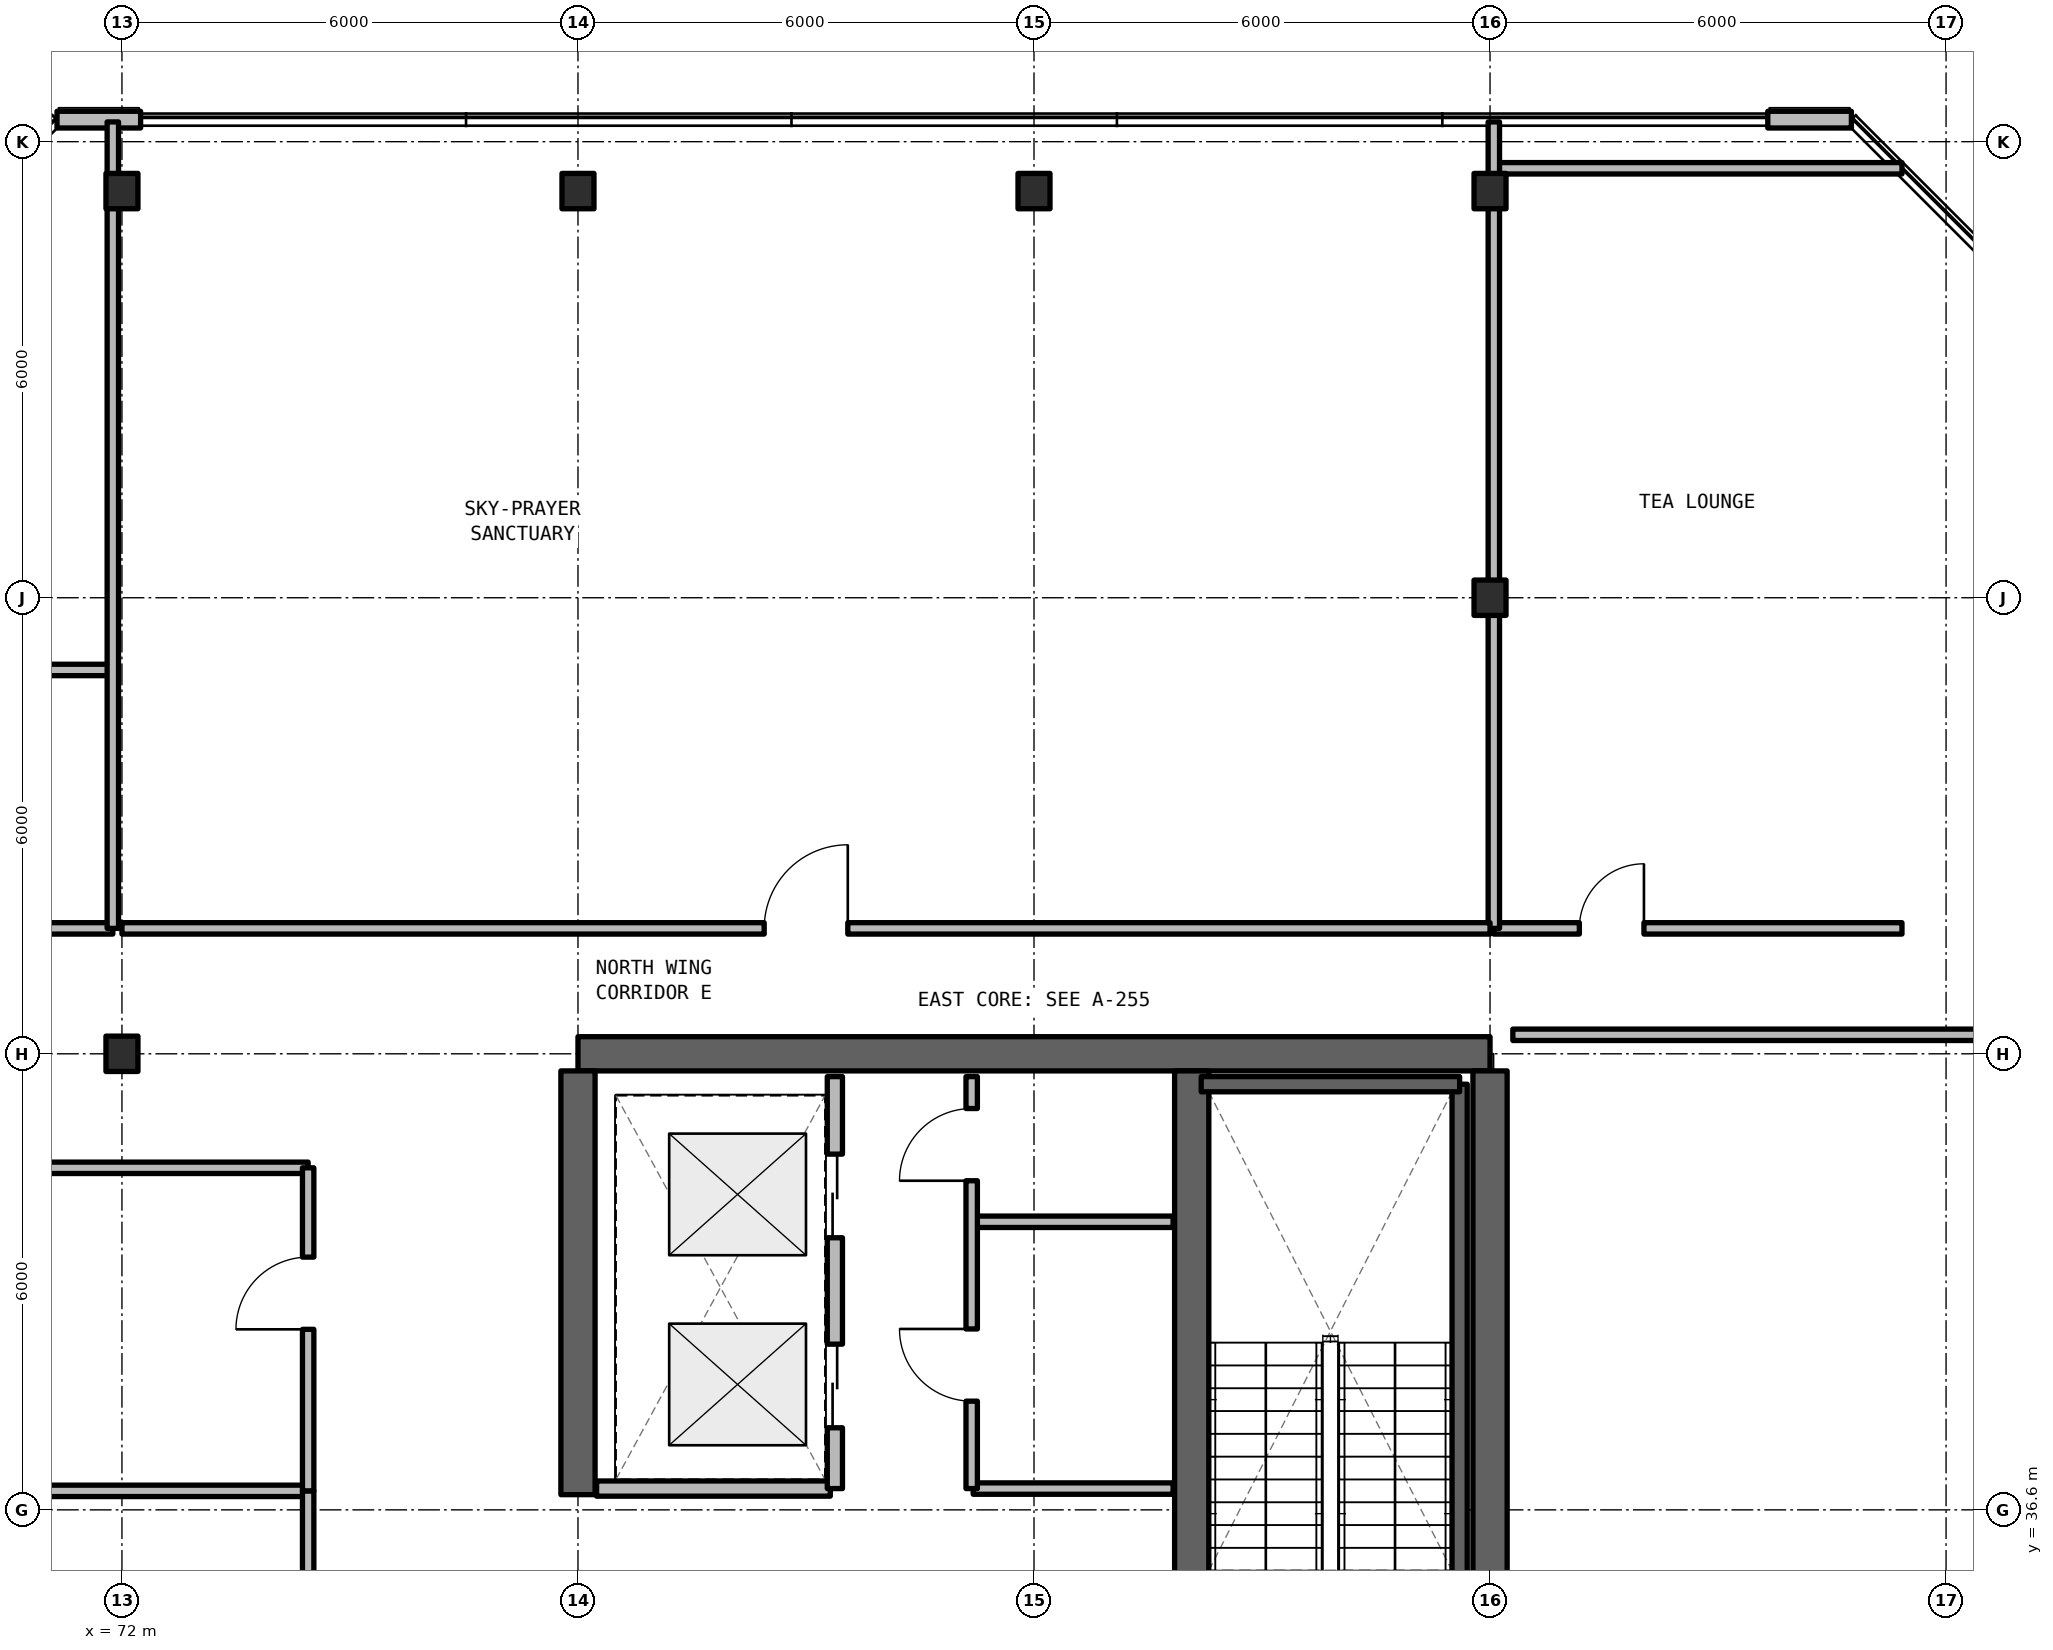
"""IFC4 building model, lengths in metres.
Left out: names, types, materials, properties, quantities, classifications, styles, units other than length and angle.
Written with IfcOpenShell. Run it as: python <this file> out.ifc"""

import sys

from ifc_helpers import new_model, si_unit, direction, frame, frame_2d, origin, origin_2d, place, context, subcontext, project, spatial, rectangle, i_section, extrude, element, fill, save


model = new_model("IFC4")
c1 = context("Model", 3, precision=1e-05, world=origin(), true_north=direction((0.0, 1.0)))
c2 = subcontext(c1, "Body", "Model", "MODEL_VIEW")
j1 = project(units=[si_unit("LENGTHUNIT", "METRE"), si_unit("PLANEANGLEUNIT", "RADIAN")], contexts=[c1])
p1 = place(None, origin())
s1 = spatial("IfcSite", under=j1, at=p1, CompositionType="ELEMENT")
p2 = place(p1, origin())
s2 = spatial("IfcBuilding", under=s1, at=p2, CompositionType="ELEMENT")
p3 = place(p2, frame((0.0, 0.0, 267.96)))
s3 = spatial("IfcBuildingStorey", under=s2, at=p3, CompositionType="ELEMENT", Elevation=267.96)
p4 = place(p3, frame((90.0, 42.6, 0.0), z_axis=(0.0, 0.0, 1.0), x_axis=(-1.0, 0.0, 0.0)))
e1 = element("IfcWall", 1, at=p4, inside=s3, PredefinedType="SHEAR", context=c2, shape_type="SweptSolid", body=[
    extrude(rectangle(XDim=12.0, YDim=0.45, at=frame_2d((6.0, 0.0))), origin(), (0.0, 0.0, 1.0), 3.63),
])
p5 = place(p3, frame((90.0, 24.825, 0.0), z_axis=(0.0, 0.0, 1.0), x_axis=(0.0, 1.0, 0.0)))
e2 = element("IfcWall", 2, at=p5, inside=s3, PredefinedType="SHEAR", context=c2, shape_type="SweptSolid", body=[
    extrude(rectangle(XDim=17.55, YDim=0.45, at=frame_2d((8.775, 0.0))), origin(), (0.0, 0.0, 1.0), 3.63),
])
p6 = place(p3, frame((78.0, 36.8, 0.0), z_axis=(0.0, 0.0, 1.0), x_axis=(0.0, 1.0, 0.0)))
e3 = element("IfcWall", 3, at=p6, inside=s3, PredefinedType="SHEAR", context=c2, shape_type="SweptSolid", body=[
    extrude(rectangle(XDim=5.575, YDim=0.45, at=frame_2d((2.788, 0.0))), origin(), (0.0, 0.0, 1.0), 3.63),
])
p7 = place(p3, frame((86.075, 24.825, 0.0), z_axis=(0.0, 0.0, 1.0), x_axis=(0.0, 1.0, 0.0)))
e4 = element("IfcWall", 4, at=p7, inside=s3, PredefinedType="SHEAR", context=c2, shape_type="SweptSolid", body=[
    extrude(rectangle(XDim=17.55, YDim=0.45, at=frame_2d((8.775, 0.0))), origin(), (0.0, 0.0, 1.0), 3.63),
])
p8 = place(p7, frame((0.425, 0.0, 0.0)))
e5 = element("IfcOpeningElement", 5, at=p8, cuts=e4, PredefinedType="OPENING", context=c2, shape_type="SweptSolid", body=[
    extrude(rectangle(XDim=1.15, YDim=2.15, at=frame_2d((0.575, 1.075))), frame((0.0, 0.235, 0.0), z_axis=(0.0, -1.0, 0.0), x_axis=(1.0, 0.0, 0.0)), (0.0, 0.0, 1.0), 0.47),
])
p9 = place(p7, frame((9.625, 0.0, 0.0)))
e6 = element("IfcOpeningElement", 6, at=p9, cuts=e4, PredefinedType="OPENING", context=c2, shape_type="SweptSolid", body=[
    extrude(rectangle(XDim=1.15, YDim=2.15, at=frame_2d((0.575, 1.075))), frame((0.0, 0.235, 0.0), z_axis=(0.0, -1.0, 0.0), x_axis=(1.0, 0.0, 0.0)), (0.0, 0.0, 1.0), 0.47),
])
for number, where, z_axis, x_axis in (
    (7, (72.0, 42.6, 0.0), (0.0, 0.0, 1.0), (1.0, 0.0, 0.0)),
    (8, (90.0, 48.6, 0.0), (0.0, 0.0, 1.0), (1.0, 0.0, 0.0)),
    (9, (72.0, 53.95, 0.0), (0.0, 0.0, 1.0), (1.0, 0.0, 0.0)),
    (10, (78.0, 53.95, 0.0), (0.0, 0.0, 1.0), (1.0, 0.0, 0.0)),
    (11, (84.0, 53.95, 0.0), (0.0, 0.0, 1.0), (1.0, 0.0, 0.0)),
    (12, (90.0, 53.95, 0.0), (0.0, 0.0, 1.0), (1.0, 0.0, 0.0)),
):
    element("IfcColumn", number, at=place(p3, frame(where, z_axis=z_axis, x_axis=x_axis)), inside=s3, PredefinedType="COLUMN", context=c2, shape_type="SweptSolid", body=[
        extrude(i_section(OverallWidth=0.421, OverallDepth=0.465, WebThickness=0.045, FlangeThickness=0.07, FilletRadius=0.015, at=origin_2d()), origin(), (0.0, 0.0, 1.0), 3.63),
    ])
for number, where, z_axis, x_axis in (
    (13, (94.754, 54.89, 0.0), (0.0, 0.0, 1.0), (-1.0, 0.0, 0.0)),
    (14, (72.246, 54.89, 0.0), (0.0, 0.0, 1.0), (-1.0, 0.0, 0.0)),
):
    element("IfcWall", number, at=place(p3, frame(where, z_axis=z_axis, x_axis=x_axis)), inside=s3, PredefinedType="SOLIDWALL", context=c2, shape_type="SweptSolid", body=[
        extrude(rectangle(XDim=1.1, YDim=0.22, at=frame_2d((0.55, 0.0))), origin(), (0.0, 0.0, 1.0), 3.41),
    ])
for number, where, z_axis, x_axis in (
    (15, (83.2, 36.88, 0.0), (0.0, 0.0, 1.0), (1.0, 0.0, 0.0)),
    (16, (83.2, 40.39, 0.0), (0.0, 0.0, 1.0), (1.0, 0.0, 0.0)),
):
    element("IfcWall", number, at=place(p3, frame(where, z_axis=z_axis, x_axis=x_axis)), inside=s3, PredefinedType="SOLIDWALL", context=c2, shape_type="SweptSolid", body=[
        extrude(rectangle(XDim=2.63, YDim=0.15, at=frame_2d((1.315, 0.0))), origin(), (0.0, 0.0, 1.0), 2.63),
    ])
p10 = place(p3, frame((83.18, 36.88, 0.0), z_axis=(0.0, 0.0, 1.0), x_axis=(0.0, 1.0, 0.0)))
e17 = element("IfcWall", 17, at=p10, inside=s3, PredefinedType="SOLIDWALL", context=c2, shape_type="SweptSolid", body=[
    extrude(rectangle(XDim=5.42, YDim=0.15, at=frame_2d((2.71, 0.0))), origin(), (0.0, 0.0, 1.0), 2.63),
])
p11 = place(p10, frame((1.15, 0.0, 0.0)))
e18 = element("IfcOpeningElement", 18, at=p11, cuts=e17, PredefinedType="OPENING", context=c2, shape_type="SweptSolid", body=[
    extrude(rectangle(XDim=0.95, YDim=2.15, at=frame_2d((0.475, 1.075))), frame((0.0, 0.085, 0.0), z_axis=(0.0, -1.0, 0.0), x_axis=(1.0, 0.0, 0.0)), (0.0, 0.0, 1.0), 0.17),
])
p12 = place(p10, frame((4.05, 0.0, 0.0)))
e19 = element("IfcOpeningElement", 19, at=p12, cuts=e17, PredefinedType="OPENING", context=c2, shape_type="SweptSolid", body=[
    extrude(rectangle(XDim=0.95, YDim=2.15, at=frame_2d((0.475, 1.075))), frame((0.0, 0.085, 0.0), z_axis=(0.0, -1.0, 0.0), x_axis=(1.0, 0.0, 0.0)), (0.0, 0.0, 1.0), 0.17),
])
p13 = place(p3, frame((78.245, 36.88, 0.0), z_axis=(0.0, 0.0, 1.0), x_axis=(1.0, 0.0, 0.0)))
e20 = element("IfcWall", 20, at=p13, inside=s3, PredefinedType="SOLIDWALL", context=c2, shape_type="SweptSolid", body=[
    extrude(rectangle(XDim=3.075, YDim=0.2, at=frame_2d((1.538, 0.0))), origin(), (0.0, 0.0, 1.0), 2.63),
])
p14 = place(p3, frame((81.38, 36.88, 0.0), z_axis=(0.0, 0.0, 1.0), x_axis=(0.0, 1.0, 0.0)))
e21 = element("IfcWall", 21, at=p14, inside=s3, PredefinedType="SOLIDWALL", context=c2, shape_type="SweptSolid", body=[
    extrude(rectangle(XDim=5.42, YDim=0.2, at=frame_2d((2.71, 0.0))), origin(), (0.0, 0.0, 1.0), 2.63),
])
p15 = place(p14, frame((0.8, 0.0, 0.0)))
e22 = element("IfcOpeningElement", 22, at=p15, cuts=e21, PredefinedType="OPENING", context=c2, shape_type="SweptSolid", body=[
    extrude(rectangle(XDim=1.1, YDim=2.2, at=frame_2d((0.55, 1.1))), frame((0.0, 0.11, 0.0), z_axis=(0.0, -1.0, 0.0), x_axis=(1.0, 0.0, 0.0)), (0.0, 0.0, 1.0), 0.22),
])
p16 = place(p14, frame((3.3, 0.0, 0.0)))
e23 = element("IfcOpeningElement", 23, at=p16, cuts=e21, PredefinedType="OPENING", context=c2, shape_type="SweptSolid", body=[
    extrude(rectangle(XDim=1.1, YDim=2.2, at=frame_2d((0.55, 1.1))), frame((0.0, 0.11, 0.0), z_axis=(0.0, -1.0, 0.0), x_axis=(1.0, 0.0, 0.0)), (0.0, 0.0, 1.0), 0.22),
])
p17 = place(p3, frame((64.8, 44.25, 0.0), z_axis=(0.0, 0.0, 1.0), x_axis=(1.0, 0.0, 0.0)))
e24 = element("IfcWall", 24, at=p17, inside=s3, PredefinedType="SOLIDWALL", context=c2, shape_type="SweptSolid", body=[
    extrude(rectangle(XDim=7.08, YDim=0.15, at=frame_2d((3.54, 0.0))), origin(), (0.0, 0.0, 1.0), 2.63),
])
p18 = place(p17, frame((3.225, 0.0, 0.0)))
e25 = element("IfcOpeningElement", 25, at=p18, cuts=e24, PredefinedType="OPENING", context=c2, shape_type="SweptSolid", body=[
    extrude(rectangle(XDim=0.85, YDim=2.1, at=frame_2d((0.425, 1.05))), frame((0.0, 0.085, 0.0), z_axis=(0.0, -1.0, 0.0), x_axis=(1.0, 0.0, 0.0)), (0.0, 0.0, 1.0), 0.17),
])
p19 = place(p3, frame((64.8, 47.65, 0.0), z_axis=(0.0, 0.0, 1.0), x_axis=(1.0, 0.0, 0.0)))
e26 = element("IfcWall", 26, at=p19, inside=s3, PredefinedType="SOLIDWALL", context=c2, shape_type="SweptSolid", body=[
    extrude(rectangle(XDim=7.08, YDim=0.15, at=frame_2d((3.54, 0.0))), origin(), (0.0, 0.0, 1.0), 2.63),
])
p20 = place(p3, frame((71.88, 44.25, 0.0), z_axis=(0.0, 0.0, 1.0), x_axis=(0.0, 1.0, 0.0)))
e27 = element("IfcWall", 27, at=p20, inside=s3, PredefinedType="SOLIDWALL", context=c2, shape_type="SweptSolid", body=[
    extrude(rectangle(XDim=10.61, YDim=0.15, at=frame_2d((5.305, 0.0))), origin(), (0.0, 0.0, 1.0), 2.63),
])
p21 = place(p3, frame((90.3, 42.85, 0.0), z_axis=(0.0, 0.0, 1.0), x_axis=(1.0, 0.0, 0.0)))
e28 = element("IfcWall", 28, at=p21, inside=s3, PredefinedType="SOLIDWALL", context=c2, shape_type="SweptSolid", body=[
    extrude(rectangle(XDim=8.52, YDim=0.15, at=frame_2d((4.26, 0.0))), origin(), (0.0, 0.0, 1.0), 2.63),
])
p22 = place(p3, frame((90.05, 44.25, 0.0), z_axis=(0.0, 0.0, 1.0), x_axis=(1.0, 0.0, 0.0)))
e29 = element("IfcWall", 29, at=p22, inside=s3, PredefinedType="SOLIDWALL", context=c2, shape_type="SweptSolid", body=[
    extrude(rectangle(XDim=5.37, YDim=0.15, at=frame_2d((2.685, 0.0))), origin(), (0.0, 0.0, 1.0), 2.63),
])
p23 = place(p22, frame((1.125, 0.0, 0.0)))
e30 = element("IfcOpeningElement", 30, at=p23, cuts=e29, PredefinedType="OPENING", context=c2, shape_type="SweptSolid", body=[
    extrude(rectangle(XDim=0.85, YDim=2.1, at=frame_2d((0.425, 1.05))), frame((0.0, 0.085, 0.0), z_axis=(0.0, -1.0, 0.0), x_axis=(1.0, 0.0, 0.0)), (0.0, 0.0, 1.0), 0.17),
])
p24 = place(p3, frame((90.05, 54.25, 0.0), z_axis=(0.0, 0.0, 1.0), x_axis=(1.0, 0.0, 0.0)))
e31 = element("IfcWall", 31, at=p24, inside=s3, PredefinedType="SOLIDWALL", context=c2, shape_type="SweptSolid", body=[
    extrude(rectangle(XDim=5.37, YDim=0.15, at=frame_2d((2.685, 0.0))), origin(), (0.0, 0.0, 1.0), 2.63),
])
p25 = place(p3, frame((90.05, 44.25, 0.0), z_axis=(0.0, 0.0, 1.0), x_axis=(0.0, 1.0, 0.0)))
e32 = element("IfcWall", 32, at=p25, inside=s3, PredefinedType="SOLIDWALL", context=c2, shape_type="SweptSolid", body=[
    extrude(rectangle(XDim=10.61, YDim=0.15, at=frame_2d((5.305, 0.0))), origin(), (0.0, 0.0, 1.0), 2.63),
])
p26 = place(p3, frame((72.0, 44.25, 0.0), z_axis=(0.0, 0.0, 1.0), x_axis=(1.0, 0.0, 0.0)))
e33 = element("IfcWall", 33, at=p26, inside=s3, PredefinedType="SOLIDWALL", context=c2, shape_type="SweptSolid", body=[
    extrude(rectangle(XDim=18.0, YDim=0.15, at=frame_2d((9.0, 0.0))), origin(), (0.0, 0.0, 1.0), 2.63),
])
p27 = place(p26, frame((8.45, 0.0, 0.0)))
e34 = element("IfcOpeningElement", 34, at=p27, cuts=e33, PredefinedType="OPENING", context=c2, shape_type="SweptSolid", body=[
    extrude(rectangle(XDim=1.1, YDim=2.15, at=frame_2d((0.55, 1.075))), frame((0.0, 0.085, 0.0), z_axis=(0.0, -1.0, 0.0), x_axis=(1.0, 0.0, 0.0)), (0.0, 0.0, 1.0), 0.17),
])
p28 = place(p3, frame((60.2, 36.85, 0.0), z_axis=(0.0, 0.0, 1.0), x_axis=(1.0, 0.0, 0.0)))
e35 = element("IfcWall", 35, at=p28, inside=s3, PredefinedType="SOLIDWALL", context=c2, shape_type="SweptSolid", body=[
    extrude(rectangle(XDim=14.25, YDim=0.15, at=frame_2d((7.125, 0.0))), origin(), (0.0, 0.0, 1.0), 2.63),
])
p29 = place(p3, frame((74.45, 31.25, 0.0), z_axis=(0.0, 0.0, 1.0), x_axis=(0.0, 1.0, 0.0)))
e36 = element("IfcWall", 36, at=p29, inside=s3, PredefinedType="SOLIDWALL", context=c2, shape_type="SweptSolid", body=[
    extrude(rectangle(XDim=5.6, YDim=0.15, at=frame_2d((2.8, 0.0))), origin(), (0.0, 0.0, 1.0), 2.63),
])
p30 = place(p29, frame((2.525, 0.0, 0.0)))
e37 = element("IfcOpeningElement", 37, at=p30, cuts=e36, PredefinedType="OPENING", context=c2, shape_type="SweptSolid", body=[
    extrude(rectangle(XDim=0.95, YDim=2.15, at=frame_2d((0.475, 1.075))), frame((0.0, 0.085, 0.0), z_axis=(0.0, -1.0, 0.0), x_axis=(1.0, 0.0, 0.0)), (0.0, 0.0, 1.0), 0.17),
])
p31 = place(p3, frame((60.2, 41.1, 0.0), z_axis=(0.0, 0.0, 1.0), x_axis=(1.0, 0.0, 0.0)))
e38 = element("IfcWall", 38, at=p31, inside=s3, PredefinedType="SOLIDWALL", context=c2, shape_type="SweptSolid", body=[
    extrude(rectangle(XDim=14.25, YDim=0.15, at=frame_2d((7.125, 0.0))), origin(), (0.0, 0.0, 1.0), 2.63),
])
p32 = place(p3, frame((74.45, 36.85, 0.0), z_axis=(0.0, 0.0, 1.0), x_axis=(0.0, 1.0, 0.0)))
e39 = element("IfcWall", 39, at=p32, inside=s3, PredefinedType="SOLIDWALL", context=c2, shape_type="SweptSolid", body=[
    extrude(rectangle(XDim=4.25, YDim=0.15, at=frame_2d((2.125, 0.0))), origin(), (0.0, 0.0, 1.0), 2.63),
])
p33 = place(p32, frame((2.125, 0.0, 0.0)))
e40 = element("IfcOpeningElement", 40, at=p33, cuts=e39, PredefinedType="OPENING", context=c2, shape_type="SweptSolid", body=[
    extrude(rectangle(XDim=0.95, YDim=2.15, at=frame_2d((0.475, 1.075))), frame((0.0, 0.085, 0.0), z_axis=(0.0, -1.0, 0.0), x_axis=(1.0, 0.0, 0.0)), (0.0, 0.0, 1.0), 0.17),
])
p34 = place(p3, frame((89.6, 34.2, 0.0), z_axis=(0.0, 0.0, 1.0), x_axis=(0.0, 1.0, 0.0)))
e41 = element("IfcWall", 41, at=p34, inside=s3, PredefinedType="SOLIDWALL", context=c2, shape_type="SweptSolid", body=[
    extrude(rectangle(XDim=8.0, YDim=0.2, at=frame_2d((4.0, 0.0))), origin(), (0.0, 0.0, 1.0), 3.63),
])
p35 = place(p3, frame((89.6, 42.2, 0.0), z_axis=(0.0, 0.0, 1.0), x_axis=(-1.0, 0.0, 0.0)))
e42 = element("IfcWall", 42, at=p35, inside=s3, PredefinedType="SOLIDWALL", context=c2, shape_type="SweptSolid", body=[
    extrude(rectangle(XDim=3.4, YDim=0.2, at=frame_2d((1.7, 0.0))), origin(), (0.0, 0.0, 1.0), 3.63),
])
p36 = place(p11, origin())
e43 = element("IfcDoor", 43, at=p36, inside=s3, OperationType="SINGLE_SWING_RIGHT", PredefinedType="DOOR", context=c2, shape_type="SweptSolid", body=[
    extrude(rectangle(XDim=0.95, YDim=2.15, at=frame_2d((0.475, 1.075))), frame((0.0, 0.025, 0.0), z_axis=(0.0, -1.0, 0.0), x_axis=(1.0, 0.0, 0.0)), (0.0, 0.0, 1.0), 0.05),
])
fill(e18, e43)
p37 = place(p12, origin())
e44 = element("IfcDoor", 44, at=p37, inside=s3, OperationType="SINGLE_SWING_LEFT", PredefinedType="DOOR", context=c2, shape_type="SweptSolid", body=[
    extrude(rectangle(XDim=0.95, YDim=2.15, at=frame_2d((0.475, 1.075))), frame((0.0, 0.025, 0.0), z_axis=(0.0, -1.0, 0.0), x_axis=(1.0, 0.0, 0.0)), (0.0, 0.0, 1.0), 0.05),
])
fill(e19, e44)
p38 = place(p15, origin())
e45 = element("IfcDoor", 45, at=p38, inside=s3, OperationType="SLIDING_TO_LEFT", PredefinedType="DOOR", context=c2, shape_type="SweptSolid", body=[
    extrude(rectangle(XDim=1.1, YDim=2.2, at=frame_2d((0.55, 1.1))), frame((0.0, 0.025, 0.0), z_axis=(0.0, -1.0, 0.0), x_axis=(1.0, 0.0, 0.0)), (0.0, 0.0, 1.0), 0.05),
])
fill(e22, e45)
p39 = place(p16, origin())
e46 = element("IfcDoor", 46, at=p39, inside=s3, OperationType="SLIDING_TO_RIGHT", PredefinedType="DOOR", context=c2, shape_type="SweptSolid", body=[
    extrude(rectangle(XDim=1.1, YDim=2.2, at=frame_2d((0.55, 1.1))), frame((0.0, 0.025, 0.0), z_axis=(0.0, -1.0, 0.0), x_axis=(1.0, 0.0, 0.0)), (0.0, 0.0, 1.0), 0.05),
])
fill(e23, e46)
p40 = place(p23, origin())
e47 = element("IfcDoor", 47, at=p40, inside=s3, OperationType="SINGLE_SWING_RIGHT", PredefinedType="DOOR", context=c2, shape_type="SweptSolid", body=[
    extrude(rectangle(XDim=0.85, YDim=2.1, at=frame_2d((0.425, 1.05))), frame((0.0, 0.025, 0.0), z_axis=(0.0, -1.0, 0.0), x_axis=(1.0, 0.0, 0.0)), (0.0, 0.0, 1.0), 0.05),
])
fill(e30, e47)
p41 = place(p27, origin())
e48 = element("IfcDoor", 48, at=p41, inside=s3, OperationType="SINGLE_SWING_RIGHT", PredefinedType="DOOR", context=c2, shape_type="SweptSolid", body=[
    extrude(rectangle(XDim=1.1, YDim=2.15, at=frame_2d((0.55, 1.075))), frame((0.0, 0.025, 0.0), z_axis=(0.0, -1.0, 0.0), x_axis=(1.0, 0.0, 0.0)), (0.0, 0.0, 1.0), 0.05),
])
fill(e34, e48)
p42 = place(p33, origin())
e49 = element("IfcDoor", 49, at=p42, inside=s3, OperationType="SINGLE_SWING_LEFT", PredefinedType="DOOR", context=c2, shape_type="SweptSolid", body=[
    extrude(rectangle(XDim=0.95, YDim=2.15, at=frame_2d((0.475, 1.075))), frame((0.0, 0.025, 0.0), z_axis=(0.0, -1.0, 0.0), x_axis=(1.0, 0.0, 0.0)), (0.0, 0.0, 1.0), 0.05),
])
fill(e40, e49)
save(model, sys.argv[1])
